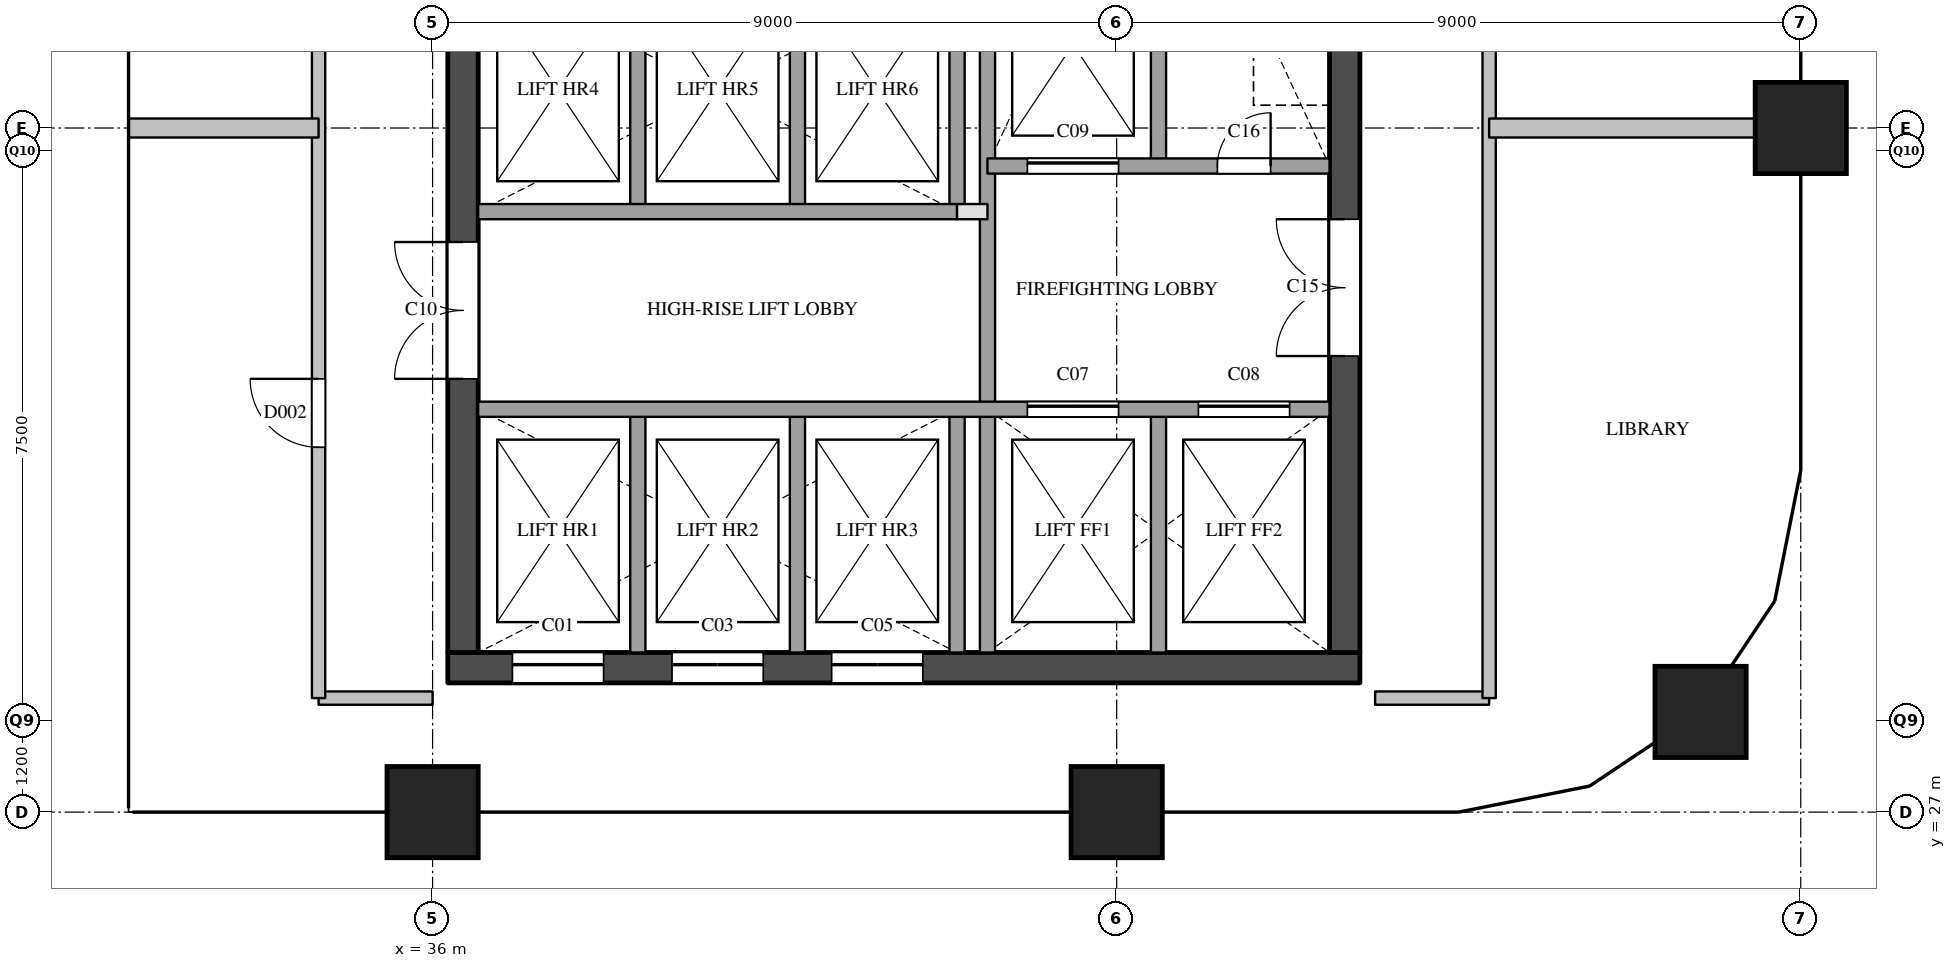
"""IFC4 building model, lengths in metres.
Left out: names, types, materials, properties, quantities, classifications, styles, units other than length and angle.
Written with IfcOpenShell. Run it as: python <this file> out.ifc"""

import sys

from ifc_helpers import new_model, si_unit, direction, frame, frame_2d, origin, origin_2d, place, context, subcontext, project, spatial, rectangle, extrude, element, fill, save


model = new_model("IFC4")
c1 = context("Model", 3, precision=1e-05, world=origin(), true_north=direction((0.0, 1.0)))
c2 = subcontext(c1, "Body", "Model", "MODEL_VIEW")
j1 = project(units=[si_unit("LENGTHUNIT", "METRE"), si_unit("PLANEANGLEUNIT", "RADIAN")], contexts=[c1])
p1 = place(None, origin())
s1 = spatial("IfcSite", under=j1, at=p1, CompositionType="ELEMENT")
p2 = place(p1, origin())
s2 = spatial("IfcBuilding", under=s1, at=p2, CompositionType="ELEMENT")
p3 = place(p2, frame((0.0, 0.0, 215.0)))
s3 = spatial("IfcBuildingStorey", under=s2, at=p3, CompositionType="ELEMENT", Elevation=215.0)
for number, where, z_axis, x_axis in (
    (1, (36.0, 27.0, 0.0), (0.0, 0.0, 1.0), (1.0, 0.0, 0.0)),
    (2, (45.0, 27.0, 0.0), (0.0, 0.0, 1.0), (1.0, 0.0, 0.0)),
    (3, (52.682, 28.318, 0.0), (0.0, 0.0, 1.0), (1.0, 0.0, 0.0)),
    (4, (54.0, 36.0, 0.0), (0.0, 0.0, 1.0), (1.0, 0.0, 0.0)),
):
    element("IfcColumn", number, at=place(p3, frame(where, z_axis=z_axis, x_axis=x_axis)), inside=s3, PredefinedType="COLUMN", context=c2, shape_type="SweptSolid", body=[
        extrude(rectangle(XDim=1.2, YDim=1.2, at=origin_2d()), origin(), (0.0, 0.0, 1.0), 3.9),
    ])
p4 = place(p3, frame((36.2, 28.9, 0.0), z_axis=(0.0, 0.0, 1.0), x_axis=(1.0, 0.0, 0.0)))
e5 = element("IfcWall", 5, at=p4, inside=s3, PredefinedType="SHEAR", context=c2, shape_type="SweptSolid", body=[
    extrude(rectangle(XDim=12.0, YDim=0.4, at=frame_2d((6.0, 0.0))), origin(), (0.0, 0.0, 1.0), 3.6),
])
p5 = place(p4, frame((0.85, 0.0, 0.0)))
e6 = element("IfcOpeningElement", 6, at=p5, cuts=e5, PredefinedType="OPENING", context=c2, shape_type="SweptSolid", body=[
    extrude(rectangle(XDim=1.2, YDim=2.1, at=frame_2d((0.6, 1.05))), frame((0.0, 0.21, 0.0), z_axis=(0.0, -1.0, 0.0), x_axis=(1.0, 0.0, 0.0)), (0.0, 0.0, 1.0), 0.42),
])
p6 = place(p4, frame((2.95, 0.0, 0.0)))
e7 = element("IfcOpeningElement", 7, at=p6, cuts=e5, PredefinedType="OPENING", context=c2, shape_type="SweptSolid", body=[
    extrude(rectangle(XDim=1.2, YDim=2.1, at=frame_2d((0.6, 1.05))), frame((0.0, 0.21, 0.0), z_axis=(0.0, -1.0, 0.0), x_axis=(1.0, 0.0, 0.0)), (0.0, 0.0, 1.0), 0.42),
])
p7 = place(p4, frame((5.05, 0.0, 0.0)))
e8 = element("IfcOpeningElement", 8, at=p7, cuts=e5, PredefinedType="OPENING", context=c2, shape_type="SweptSolid", body=[
    extrude(rectangle(XDim=1.2, YDim=2.1, at=frame_2d((0.6, 1.05))), frame((0.0, 0.21, 0.0), z_axis=(0.0, -1.0, 0.0), x_axis=(1.0, 0.0, 0.0)), (0.0, 0.0, 1.0), 0.42),
])
p8 = place(p3, frame((36.4, 29.1, 0.0), z_axis=(0.0, 0.0, 1.0), x_axis=(0.0, 1.0, 0.0)))
e9 = element("IfcWall", 9, at=p8, inside=s3, PredefinedType="SHEAR", context=c2, shape_type="SweptSolid", body=[
    extrude(rectangle(XDim=20.3, YDim=0.4, at=frame_2d((10.15, 0.0))), origin(), (0.0, 0.0, 1.0), 3.6),
])
p9 = place(p8, frame((3.6, 0.0, 0.0)))
e10 = element("IfcOpeningElement", 10, at=p9, cuts=e9, PredefinedType="OPENING", context=c2, shape_type="SweptSolid", body=[
    extrude(rectangle(XDim=1.8, YDim=2.1, at=frame_2d((0.9, 1.05))), frame((0.0, 0.21, 0.0), z_axis=(0.0, -1.0, 0.0), x_axis=(1.0, 0.0, 0.0)), (0.0, 0.0, 1.0), 0.42),
])
p10 = place(p8, frame((16.4, 0.0, 0.0)))
e11 = element("IfcOpeningElement", 11, at=p10, cuts=e9, PredefinedType="OPENING", context=c2, shape_type="SweptSolid", body=[
    extrude(rectangle(XDim=1.0, YDim=2.1, at=frame_2d((0.5, 1.05))), frame((0.0, 0.21, 0.0), z_axis=(0.0, -1.0, 0.0), x_axis=(1.0, 0.0, 0.0)), (0.0, 0.0, 1.0), 0.42),
])
p11 = place(p3, frame((48.0, 29.1, 0.0), z_axis=(0.0, 0.0, 1.0), x_axis=(0.0, 1.0, 0.0)))
e12 = element("IfcWall", 12, at=p11, inside=s3, PredefinedType="SHEAR", context=c2, shape_type="SweptSolid", body=[
    extrude(rectangle(XDim=20.3, YDim=0.4, at=frame_2d((10.15, 0.0))), origin(), (0.0, 0.0, 1.0), 3.6),
])
p12 = place(p11, frame((12.5, 0.0, 0.0)))
e13 = element("IfcOpeningElement", 13, at=p12, cuts=e12, PredefinedType="OPENING", context=c2, shape_type="SweptSolid", body=[
    extrude(rectangle(XDim=0.7, YDim=2.1, at=frame_2d((0.35, 1.05))), frame((0.0, 0.21, 0.0), z_axis=(0.0, -1.0, 0.0), x_axis=(1.0, 0.0, 0.0)), (0.0, 0.0, 1.0), 0.42),
])
p13 = place(p11, frame((3.9, 0.0, 0.0)))
e14 = element("IfcOpeningElement", 14, at=p13, cuts=e12, PredefinedType="OPENING", context=c2, shape_type="SweptSolid", body=[
    extrude(rectangle(XDim=1.8, YDim=2.1, at=frame_2d((0.9, 1.05))), frame((0.0, 0.21, 0.0), z_axis=(0.0, -1.0, 0.0), x_axis=(1.0, 0.0, 0.0)), (0.0, 0.0, 1.0), 0.42),
])
p14 = place(p3, frame((38.7, 29.1, 0.0), z_axis=(0.0, 0.0, 1.0), x_axis=(0.0, 1.0, 0.0)))
e15 = element("IfcWall", 15, at=p14, inside=s3, PredefinedType="SOLIDWALL", context=c2, shape_type="SweptSolid", body=[
    extrude(rectangle(XDim=3.2, YDim=0.2, at=frame_2d((1.6, 0.0))), origin(), (0.0, 0.0, 1.0), 3.6),
])
p15 = place(p3, frame((38.7, 34.9, 0.0), z_axis=(0.0, 0.0, 1.0), x_axis=(0.0, 1.0, 0.0)))
e16 = element("IfcWall", 16, at=p15, inside=s3, PredefinedType="SOLIDWALL", context=c2, shape_type="SweptSolid", body=[
    extrude(rectangle(XDim=3.2, YDim=0.2, at=frame_2d((1.6, 0.0))), origin(), (0.0, 0.0, 1.0), 3.6),
])
p16 = place(p3, frame((40.8, 29.1, 0.0), z_axis=(0.0, 0.0, 1.0), x_axis=(0.0, 1.0, 0.0)))
e17 = element("IfcWall", 17, at=p16, inside=s3, PredefinedType="SOLIDWALL", context=c2, shape_type="SweptSolid", body=[
    extrude(rectangle(XDim=3.2, YDim=0.2, at=frame_2d((1.6, 0.0))), origin(), (0.0, 0.0, 1.0), 3.6),
])
p17 = place(p3, frame((40.8, 34.9, 0.0), z_axis=(0.0, 0.0, 1.0), x_axis=(0.0, 1.0, 0.0)))
e18 = element("IfcWall", 18, at=p17, inside=s3, PredefinedType="SOLIDWALL", context=c2, shape_type="SweptSolid", body=[
    extrude(rectangle(XDim=3.2, YDim=0.2, at=frame_2d((1.6, 0.0))), origin(), (0.0, 0.0, 1.0), 3.6),
])
p18 = place(p3, frame((42.9, 29.1, 0.0), z_axis=(0.0, 0.0, 1.0), x_axis=(0.0, 1.0, 0.0)))
e19 = element("IfcWall", 19, at=p18, inside=s3, PredefinedType="SOLIDWALL", context=c2, shape_type="SweptSolid", body=[
    extrude(rectangle(XDim=3.2, YDim=0.2, at=frame_2d((1.6, 0.0))), origin(), (0.0, 0.0, 1.0), 3.6),
])
p19 = place(p3, frame((42.9, 34.9, 0.0), z_axis=(0.0, 0.0, 1.0), x_axis=(0.0, 1.0, 0.0)))
e20 = element("IfcWall", 20, at=p19, inside=s3, PredefinedType="SOLIDWALL", context=c2, shape_type="SweptSolid", body=[
    extrude(rectangle(XDim=3.2, YDim=0.2, at=frame_2d((1.6, 0.0))), origin(), (0.0, 0.0, 1.0), 3.6),
])
p20 = place(p3, frame((43.3, 29.1, 0.0), z_axis=(0.0, 0.0, 1.0), x_axis=(0.0, 1.0, 0.0)))
e21 = element("IfcWall", 21, at=p20, inside=s3, PredefinedType="SOLIDWALL", context=c2, shape_type="SweptSolid", body=[
    extrude(rectangle(XDim=9.9, YDim=0.2, at=frame_2d((4.95, 0.0))), origin(), (0.0, 0.0, 1.0), 3.6),
])
for number, where, z_axis, x_axis in (
    (22, (45.55, 29.1, 0.0), (0.0, 0.0, 1.0), (0.0, 1.0, 0.0)),
    (23, (45.55, 35.5, 0.0), (0.0, 0.0, 1.0), (0.0, 1.0, 0.0)),
):
    element("IfcWall", number, at=place(p3, frame(where, z_axis=z_axis, x_axis=x_axis)), inside=s3, PredefinedType="SOLIDWALL", context=c2, shape_type="SweptSolid", body=[
        extrude(rectangle(XDim=3.2, YDim=0.2, at=frame_2d((1.6, 0.0))), origin(), (0.0, 0.0, 1.0), 3.6),
    ])
p21 = place(p3, frame((36.6, 32.3, 0.0), z_axis=(0.0, 0.0, 1.0), x_axis=(1.0, 0.0, 0.0)))
e24 = element("IfcWall", 24, at=p21, inside=s3, PredefinedType="SOLIDWALL", context=c2, shape_type="SweptSolid", body=[
    extrude(rectangle(XDim=11.2, YDim=0.2, at=frame_2d((5.6, 0.0))), origin(), (0.0, 0.0, 1.0), 3.6),
])
p22 = place(p21, frame((7.225, 0.0, 0.0)))
e25 = element("IfcOpeningElement", 25, at=p22, cuts=e24, PredefinedType="OPENING", context=c2, shape_type="SweptSolid", body=[
    extrude(rectangle(XDim=1.2, YDim=2.1, at=frame_2d((0.6, 1.05))), frame((0.0, 0.11, 0.0), z_axis=(0.0, -1.0, 0.0), x_axis=(1.0, 0.0, 0.0)), (0.0, 0.0, 1.0), 0.22),
])
p23 = place(p21, frame((9.475, 0.0, 0.0)))
e26 = element("IfcOpeningElement", 26, at=p23, cuts=e24, PredefinedType="OPENING", context=c2, shape_type="SweptSolid", body=[
    extrude(rectangle(XDim=1.2, YDim=2.1, at=frame_2d((0.6, 1.05))), frame((0.0, 0.11, 0.0), z_axis=(0.0, -1.0, 0.0), x_axis=(1.0, 0.0, 0.0)), (0.0, 0.0, 1.0), 0.22),
])
p24 = place(p3, frame((42.9, 34.9, 0.0), z_axis=(0.0, 0.0, 1.0), x_axis=(1.0, 0.0, 0.0)))
e27 = element("IfcWall", 27, at=p24, inside=s3, PredefinedType="PARTITIONING", context=c2, shape_type="SweptSolid", body=[
    extrude(rectangle(XDim=0.4, YDim=0.2, at=frame_2d((0.2, 0.0))), origin(), (0.0, 0.0, 1.0), 3.6),
])
p25 = place(p3, frame((36.6, 34.9, 0.0), z_axis=(0.0, 0.0, 1.0), x_axis=(1.0, 0.0, 0.0)))
e28 = element("IfcWall", 28, at=p25, inside=s3, PredefinedType="SOLIDWALL", context=c2, shape_type="SweptSolid", body=[
    extrude(rectangle(XDim=6.3, YDim=0.2, at=frame_2d((3.15, 0.0))), origin(), (0.0, 0.0, 1.0), 3.6),
])
p26 = place(p3, frame((43.3, 35.5, 0.0), z_axis=(0.0, 0.0, 1.0), x_axis=(1.0, 0.0, 0.0)))
e29 = element("IfcWall", 29, at=p26, inside=s3, PredefinedType="SOLIDWALL", context=c2, shape_type="SweptSolid", body=[
    extrude(rectangle(XDim=4.5, YDim=0.2, at=frame_2d((2.25, 0.0))), origin(), (0.0, 0.0, 1.0), 3.6),
])
p27 = place(p26, frame((0.525, 0.0, 0.0)))
e30 = element("IfcOpeningElement", 30, at=p27, cuts=e29, PredefinedType="OPENING", context=c2, shape_type="SweptSolid", body=[
    extrude(rectangle(XDim=1.2, YDim=2.1, at=frame_2d((0.6, 1.05))), frame((0.0, 0.11, 0.0), z_axis=(0.0, -1.0, 0.0), x_axis=(1.0, 0.0, 0.0)), (0.0, 0.0, 1.0), 0.22),
])
p28 = place(p26, frame((3.025, 0.0, 0.0)))
e31 = element("IfcOpeningElement", 31, at=p28, cuts=e29, PredefinedType="OPENING", context=c2, shape_type="SweptSolid", body=[
    extrude(rectangle(XDim=0.7, YDim=2.1, at=frame_2d((0.35, 1.05))), frame((0.0, 0.11, 0.0), z_axis=(0.0, -1.0, 0.0), x_axis=(1.0, 0.0, 0.0)), (0.0, 0.0, 1.0), 0.22),
])
for number, where, z_axis, x_axis in (
    (32, (34.5, 28.5, 0.0), (0.0, 0.0, 1.0), (1.0, 0.0, 0.0)),
    (33, (48.4, 28.5, 0.0), (0.0, 0.0, 1.0), (1.0, 0.0, 0.0)),
):
    element("IfcWall", number, at=place(p3, frame(where, z_axis=z_axis, x_axis=x_axis)), inside=s3, PredefinedType="PARTITIONING", context=c2, shape_type="SweptSolid", body=[
        extrude(rectangle(XDim=1.5, YDim=0.175, at=frame_2d((0.75, 0.0))), origin(), (0.0, 0.0, 1.0), 3.6),
    ])
p29 = place(p3, frame((34.5, 28.5, 0.0), z_axis=(0.0, 0.0, 1.0), x_axis=(0.0, 1.0, 0.0)))
e34 = element("IfcWall", 34, at=p29, inside=s3, PredefinedType="PARTITIONING", context=c2, shape_type="SweptSolid", body=[
    extrude(rectangle(XDim=15.75, YDim=0.175, at=frame_2d((7.875, 0.0))), origin(), (0.0, 0.0, 1.0), 3.6),
])
p30 = place(p29, frame((3.3, 0.0, 0.0)))
e35 = element("IfcOpeningElement", 35, at=p30, cuts=e34, PredefinedType="OPENING", context=c2, shape_type="SweptSolid", body=[
    extrude(rectangle(XDim=0.9, YDim=2.1, at=frame_2d((0.45, 1.05))), frame((0.0, 0.097, 0.0), z_axis=(0.0, -1.0, 0.0), x_axis=(1.0, 0.0, 0.0)), (0.0, 0.0, 1.0), 0.195),
])
p31 = place(p29, frame((11.175, 0.0, 0.0)))
e36 = element("IfcOpeningElement", 36, at=p31, cuts=e34, PredefinedType="OPENING", context=c2, shape_type="SweptSolid", body=[
    extrude(rectangle(XDim=0.9, YDim=2.1, at=frame_2d((0.45, 1.05))), frame((0.0, 0.097, 0.0), z_axis=(0.0, -1.0, 0.0), x_axis=(1.0, 0.0, 0.0)), (0.0, 0.0, 1.0), 0.195),
])
p32 = place(p3, frame((49.9, 28.5, 0.0), z_axis=(0.0, 0.0, 1.0), x_axis=(0.0, 1.0, 0.0)))
e37 = element("IfcWall", 37, at=p32, inside=s3, PredefinedType="PARTITIONING", context=c2, shape_type="SweptSolid", body=[
    extrude(rectangle(XDim=23.0, YDim=0.175, at=frame_2d((11.5, 0.0))), origin(), (0.0, 0.0, 1.0), 3.6),
])
p33 = place(p32, frame((14.8, 0.0, 0.0)))
e38 = element("IfcOpeningElement", 38, at=p33, cuts=e37, PredefinedType="OPENING", context=c2, shape_type="SweptSolid", body=[
    extrude(rectangle(XDim=0.9, YDim=2.1, at=frame_2d((0.45, 1.05))), frame((0.0, 0.097, 0.0), z_axis=(0.0, -1.0, 0.0), x_axis=(1.0, 0.0, 0.0)), (0.0, 0.0, 1.0), 0.195),
])
p34 = place(p3, frame((32.0, 36.0, 0.0), z_axis=(0.0, 0.0, 1.0), x_axis=(1.0, 0.0, 0.0)))
e39 = element("IfcWall", 39, at=p34, inside=s3, PredefinedType="PARTITIONING", context=c2, shape_type="SweptSolid", body=[
    extrude(rectangle(XDim=2.5, YDim=0.25, at=frame_2d((1.25, 0.0))), origin(), (0.0, 0.0, 1.0), 3.6),
])
p35 = place(p3, frame((49.9, 36.0, 0.0), z_axis=(0.0, 0.0, 1.0), x_axis=(1.0, 0.0, 0.0)))
e40 = element("IfcWall", 40, at=p35, inside=s3, PredefinedType="PARTITIONING", context=c2, shape_type="SweptSolid", body=[
    extrude(rectangle(XDim=4.1, YDim=0.25, at=frame_2d((2.05, 0.0))), origin(), (0.0, 0.0, 1.0), 3.6),
])
p36 = place(p5, origin())
e41 = element("IfcDoor", 41, at=p36, inside=s3, OperationType="SLIDING_TO_LEFT", PredefinedType="DOOR", context=c2, shape_type="SweptSolid", body=[
    extrude(rectangle(XDim=1.2, YDim=2.1, at=frame_2d((0.6, 1.05))), frame((0.0, 0.025, 0.0), z_axis=(0.0, -1.0, 0.0), x_axis=(1.0, 0.0, 0.0)), (0.0, 0.0, 1.0), 0.05),
])
fill(e6, e41)
p37 = place(p6, origin())
e42 = element("IfcDoor", 42, at=p37, inside=s3, OperationType="SLIDING_TO_LEFT", PredefinedType="DOOR", context=c2, shape_type="SweptSolid", body=[
    extrude(rectangle(XDim=1.2, YDim=2.1, at=frame_2d((0.6, 1.05))), frame((0.0, 0.025, 0.0), z_axis=(0.0, -1.0, 0.0), x_axis=(1.0, 0.0, 0.0)), (0.0, 0.0, 1.0), 0.05),
])
fill(e7, e42)
p38 = place(p7, origin())
e43 = element("IfcDoor", 43, at=p38, inside=s3, OperationType="SLIDING_TO_LEFT", PredefinedType="DOOR", context=c2, shape_type="SweptSolid", body=[
    extrude(rectangle(XDim=1.2, YDim=2.1, at=frame_2d((0.6, 1.05))), frame((0.0, 0.025, 0.0), z_axis=(0.0, -1.0, 0.0), x_axis=(1.0, 0.0, 0.0)), (0.0, 0.0, 1.0), 0.05),
])
fill(e8, e43)
p39 = place(p22, origin())
e44 = element("IfcDoor", 44, at=p39, inside=s3, OperationType="SLIDING_TO_LEFT", PredefinedType="DOOR", context=c2, shape_type="SweptSolid", body=[
    extrude(rectangle(XDim=1.2, YDim=2.1, at=frame_2d((0.6, 1.05))), frame((0.0, 0.025, 0.0), z_axis=(0.0, -1.0, 0.0), x_axis=(1.0, 0.0, 0.0)), (0.0, 0.0, 1.0), 0.05),
])
fill(e25, e44)
p40 = place(p23, origin())
e45 = element("IfcDoor", 45, at=p40, inside=s3, OperationType="SLIDING_TO_LEFT", PredefinedType="DOOR", context=c2, shape_type="SweptSolid", body=[
    extrude(rectangle(XDim=1.2, YDim=2.1, at=frame_2d((0.6, 1.05))), frame((0.0, 0.025, 0.0), z_axis=(0.0, -1.0, 0.0), x_axis=(1.0, 0.0, 0.0)), (0.0, 0.0, 1.0), 0.05),
])
fill(e26, e45)
p41 = place(p27, origin())
e46 = element("IfcDoor", 46, at=p41, inside=s3, OperationType="SLIDING_TO_LEFT", PredefinedType="DOOR", context=c2, shape_type="SweptSolid", body=[
    extrude(rectangle(XDim=1.2, YDim=2.1, at=frame_2d((0.6, 1.05))), frame((0.0, 0.025, 0.0), z_axis=(0.0, -1.0, 0.0), x_axis=(1.0, 0.0, 0.0)), (0.0, 0.0, 1.0), 0.05),
])
fill(e30, e46)
p42 = place(p9, origin())
e47 = element("IfcDoor", 47, at=p42, inside=s3, OperationType="DOUBLE_DOOR_SINGLE_SWING", PredefinedType="DOOR", context=c2, shape_type="SweptSolid", body=[
    extrude(rectangle(XDim=1.8, YDim=2.1, at=frame_2d((0.9, 1.05))), frame((0.0, 0.025, 0.0), z_axis=(0.0, -1.0, 0.0), x_axis=(1.0, 0.0, 0.0)), (0.0, 0.0, 1.0), 0.05),
])
fill(e10, e47)
p43 = place(p13, origin())
e48 = element("IfcDoor", 48, at=p43, inside=s3, OperationType="DOUBLE_DOOR_SINGLE_SWING", PredefinedType="DOOR", context=c2, shape_type="SweptSolid", body=[
    extrude(rectangle(XDim=1.8, YDim=2.1, at=frame_2d((0.9, 1.05))), frame((0.0, 0.025, 0.0), z_axis=(0.0, -1.0, 0.0), x_axis=(1.0, 0.0, 0.0)), (0.0, 0.0, 1.0), 0.05),
])
fill(e14, e48)
p44 = place(p28, origin())
e49 = element("IfcDoor", 49, at=p44, inside=s3, OperationType="SINGLE_SWING_RIGHT", PredefinedType="DOOR", context=c2, shape_type="SweptSolid", body=[
    extrude(rectangle(XDim=0.7, YDim=2.1, at=frame_2d((0.35, 1.05))), frame((0.0, 0.025, 0.0), z_axis=(0.0, -1.0, 0.0), x_axis=(1.0, 0.0, 0.0)), (0.0, 0.0, 1.0), 0.05),
])
fill(e31, e49)
p45 = place(p30, origin())
e50 = element("IfcDoor", 50, at=p45, inside=s3, OperationType="SINGLE_SWING_RIGHT", PredefinedType="DOOR", context=c2, shape_type="SweptSolid", body=[
    extrude(rectangle(XDim=0.9, YDim=2.1, at=frame_2d((0.45, 1.05))), frame((0.0, 0.025, 0.0), z_axis=(0.0, -1.0, 0.0), x_axis=(1.0, 0.0, 0.0)), (0.0, 0.0, 1.0), 0.05),
])
fill(e35, e50)
save(model, sys.argv[1])
